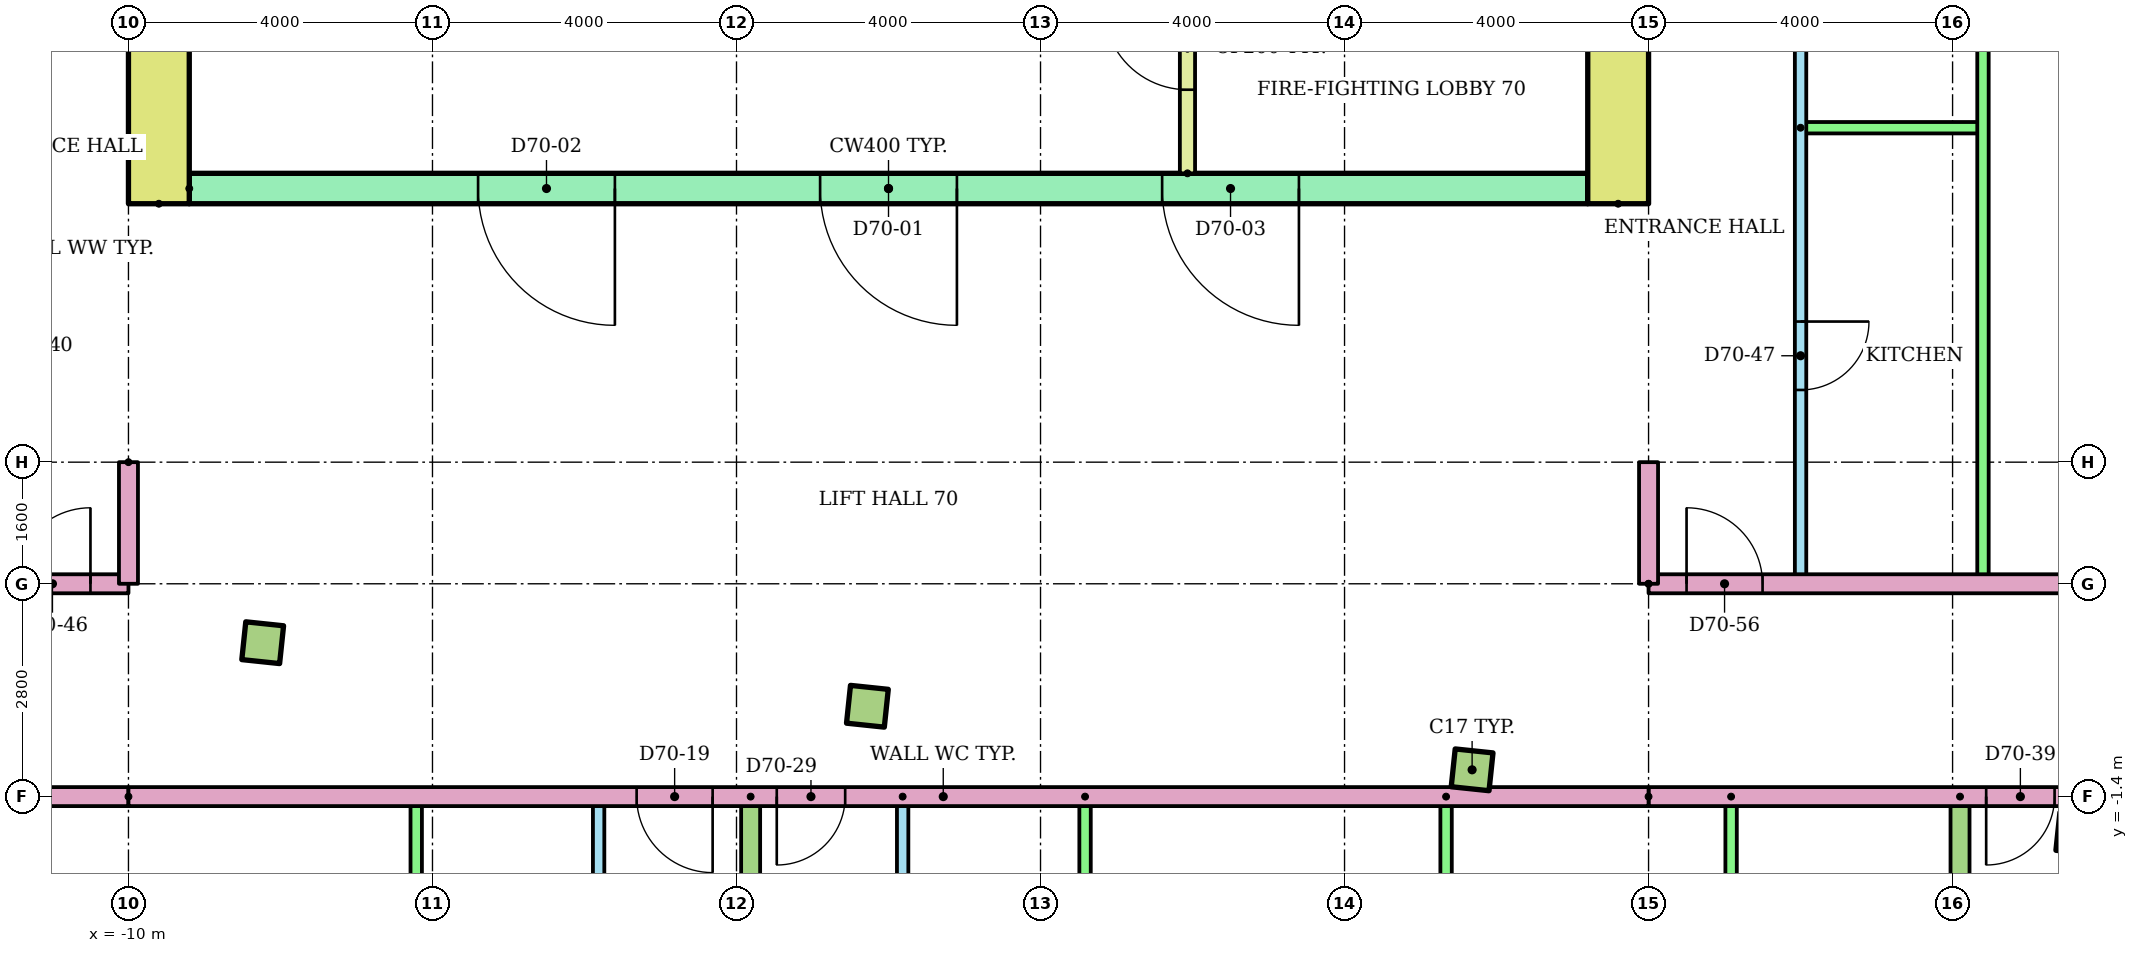
"""IFC4 building model, lengths in metres.
Left out: names, types, materials, properties, quantities, classifications, styles, units other than length and angle.
Written with IfcOpenShell. Run it as: python <this file> out.ifc"""

import sys

from ifc_helpers import new_model, si_unit, direction, frame, frame_2d, origin, origin_2d, place, context, subcontext, project, spatial, rectangle, extrude, element, fill, save


model = new_model("IFC4")
c1 = context("Model", 3, precision=1e-05, world=origin(), true_north=direction((0.0, 1.0)))
c2 = subcontext(c1, "Body", "Model", "MODEL_VIEW")
j1 = project(units=[si_unit("LENGTHUNIT", "METRE"), si_unit("PLANEANGLEUNIT", "RADIAN")], contexts=[c1])
p1 = place(None, origin())
s1 = spatial("IfcSite", under=j1, at=p1, CompositionType="ELEMENT")
p2 = place(p1, origin())
s2 = spatial("IfcBuilding", under=s1, at=p2, CompositionType="ELEMENT")
p3 = place(p2, frame((0.0, 0.0, 269.1)))
s3 = spatial("IfcBuildingStorey", under=s2, at=p3, CompositionType="ELEMENT", Elevation=269.1)
for number, where, z_axis, x_axis in (
    (1, (-8.234, 0.625, 0.0), (0.0, 0.0, 1.0), (0.995, -0.105, 0.0)),
    (2, (-0.278, -0.211, 0.0), (0.0, 0.0, 1.0), (0.995, -0.105, 0.0)),
    (3, (7.678, -1.048, 0.0), (0.0, 0.0, 1.0), (0.995, -0.105, 0.0)),
    (4, (15.635, -1.884, 0.0), (0.0, 0.0, 1.0), (0.995, -0.105, 0.0)),
):
    element("IfcColumn", number, at=place(p3, frame(where, z_axis=z_axis, x_axis=x_axis)), inside=s3, PredefinedType="COLUMN", context=c2, shape_type="SweptSolid", body=[
        extrude(rectangle(XDim=0.5, YDim=0.5, at=origin_2d()), origin(), (0.0, 0.0, 1.0), 3.2),
    ])
for number, where, z_axis, x_axis in (
    (5, (-9.6, 6.4, 0.0), (0.0, 0.0, 1.0), (0.0, 1.0, 0.0)),
    (6, (9.6, 6.4, 0.0), (0.0, 0.0, 1.0), (0.0, 1.0, 0.0)),
):
    element("IfcWall", number, at=place(p3, frame(where, z_axis=z_axis, x_axis=x_axis)), inside=s3, PredefinedType="SHEAR", context=c2, shape_type="SweptSolid", body=[
        extrude(rectangle(XDim=13.6, YDim=0.8, at=frame_2d((6.8, 0.0))), origin(), (0.0, 0.0, 1.0), 2.92),
    ])
p4 = place(p3, frame((-9.2, 6.6, 0.0)))
e7 = element("IfcWall", 7, at=p4, inside=s3, PredefinedType="SHEAR", context=c2, shape_type="SweptSolid", body=[
    extrude(rectangle(XDim=18.4, YDim=0.4, at=frame_2d((9.2, 0.0))), origin(), (0.0, 0.0, 1.0), 2.92),
])
p5 = place(p4, frame((8.3, 0.0, 0.0)))
e8 = element("IfcOpeningElement", 8, at=p5, cuts=e7, PredefinedType="OPENING", context=c2, shape_type="SweptSolid", body=[
    extrude(rectangle(XDim=1.8, YDim=2.1, at=frame_2d((0.9, 1.05))), frame((0.0, 0.21, 0.0), z_axis=(0.0, -1.0, 0.0), x_axis=(1.0, 0.0, 0.0)), (0.0, 0.0, 1.0), 0.42),
])
p6 = place(p4, frame((3.8, 0.0, 0.0)))
e9 = element("IfcOpeningElement", 9, at=p6, cuts=e7, PredefinedType="OPENING", context=c2, shape_type="SweptSolid", body=[
    extrude(rectangle(XDim=1.8, YDim=2.1, at=frame_2d((0.9, 1.05))), frame((0.0, 0.21, 0.0), z_axis=(0.0, -1.0, 0.0), x_axis=(1.0, 0.0, 0.0)), (0.0, 0.0, 1.0), 0.42),
])
p7 = place(p4, frame((12.8, 0.0, 0.0)))
e10 = element("IfcOpeningElement", 10, at=p7, cuts=e7, PredefinedType="OPENING", context=c2, shape_type="SweptSolid", body=[
    extrude(rectangle(XDim=1.8, YDim=2.1, at=frame_2d((0.9, 1.05))), frame((0.0, 0.21, 0.0), z_axis=(0.0, -1.0, 0.0), x_axis=(1.0, 0.0, 0.0)), (0.0, 0.0, 1.0), 0.42),
])
p8 = place(p3, frame((3.933, 6.8, 0.0), z_axis=(0.0, 0.0, 1.0), x_axis=(0.0, 1.0, 0.0)))
e11 = element("IfcWall", 11, at=p8, inside=s3, PredefinedType="PARTITIONING", context=c2, shape_type="SweptSolid", body=[
    extrude(rectangle(XDim=3.3, YDim=0.2, at=frame_2d((1.65, 0.0))), origin(), (0.0, 0.0, 1.0), 2.92),
])
p9 = place(p8, frame((1.1, 0.0, 0.0)))
e12 = element("IfcOpeningElement", 12, at=p9, cuts=e11, PredefinedType="OPENING", context=c2, shape_type="SweptSolid", body=[
    extrude(rectangle(XDim=1.1, YDim=2.1, at=frame_2d((0.55, 1.05))), frame((0.0, 0.11, 0.0), z_axis=(0.0, -1.0, 0.0), x_axis=(1.0, 0.0, 0.0)), (0.0, 0.0, 1.0), 0.22),
])
p10 = place(p3, frame((-3.814, -7.047, 0.0), z_axis=(0.0, 0.0, 1.0), x_axis=(0.0, 1.0, 0.0)))
e13 = element("IfcWall", 13, at=p10, inside=s3, PredefinedType="PARTITIONING", context=c2, shape_type="SweptSolid", body=[
    extrude(rectangle(XDim=5.647, YDim=0.15, at=frame_2d((2.823, 0.0))), origin(), (0.0, 0.0, 1.0), 2.4),
])
p11 = place(p10, frame((3.697, 0.0, 0.0)))
e14 = element("IfcOpeningElement", 14, at=p11, cuts=e13, PredefinedType="OPENING", context=c2, shape_type="SweptSolid", body=[
    extrude(rectangle(XDim=0.9, YDim=2.1, at=frame_2d((0.45, 1.05))), frame((0.0, 0.085, 0.0), z_axis=(0.0, -1.0, 0.0), x_axis=(1.0, 0.0, 0.0)), (0.0, 0.0, 1.0), 0.17),
])
p12 = place(p10, frame((0.923, 0.0, 0.0)))
e15 = element("IfcOpeningElement", 15, at=p12, cuts=e13, PredefinedType="OPENING", context=c2, shape_type="SweptSolid", body=[
    extrude(rectangle(XDim=0.8, YDim=2.1, at=frame_2d((0.4, 1.05))), frame((0.0, 0.085, 0.0), z_axis=(0.0, -1.0, 0.0), x_axis=(1.0, 0.0, 0.0)), (0.0, 0.0, 1.0), 0.17),
])
p13 = place(p3, frame((-6.214, -7.047, 0.0), z_axis=(0.0, 0.0, 1.0), x_axis=(0.0, 1.0, 0.0)))
e16 = element("IfcWall", 16, at=p13, inside=s3, PredefinedType="PARTITIONING", context=c2, shape_type="SweptSolid", body=[
    extrude(rectangle(XDim=5.647, YDim=0.15, at=frame_2d((2.823, 0.0))), origin(), (0.0, 0.0, 1.0), 2.4),
])
p14 = place(p3, frame((0.186, -1.4, 0.0), z_axis=(0.0, 0.0, 1.0), x_axis=(0.0, -1.0, 0.0)))
e17 = element("IfcWall", 17, at=p14, inside=s3, PredefinedType="PARTITIONING", context=c2, shape_type="SweptSolid", body=[
    extrude(rectangle(XDim=7.484, YDim=0.15, at=frame_2d((3.742, 0.0))), origin(), (0.0, 0.0, 1.0), 2.4),
])
p15 = place(p14, frame((1.55, 0.0, 0.0)))
e18 = element("IfcOpeningElement", 18, at=p15, cuts=e17, PredefinedType="OPENING", context=c2, shape_type="SweptSolid", body=[
    extrude(rectangle(XDim=0.9, YDim=2.1, at=frame_2d((0.45, 1.05))), frame((0.0, 0.085, 0.0), z_axis=(0.0, -1.0, 0.0), x_axis=(1.0, 0.0, 0.0)), (0.0, 0.0, 1.0), 0.17),
])
p16 = place(p14, frame((4.966, 0.0, 0.0)))
e19 = element("IfcOpeningElement", 19, at=p16, cuts=e17, PredefinedType="OPENING", context=c2, shape_type="SweptSolid", body=[
    extrude(rectangle(XDim=0.8, YDim=2.1, at=frame_2d((0.4, 1.05))), frame((0.0, 0.085, 0.0), z_axis=(0.0, -1.0, 0.0), x_axis=(1.0, 0.0, 0.0)), (0.0, 0.0, 1.0), 0.17),
])
for number, where, z_axis, x_axis in (
    (20, (2.586, -1.4, 0.0), (0.0, 0.0, 1.0), (0.0, -1.0, 0.0)),
    (21, (7.336, -1.4, 0.0), (0.0, 0.0, 1.0), (0.0, -1.0, 0.0)),
    (22, (11.086, -1.4, 0.0), (0.0, 0.0, 1.0), (0.0, -1.0, 0.0)),
):
    element("IfcWall", number, at=place(p3, frame(where, z_axis=z_axis, x_axis=x_axis)), inside=s3, PredefinedType="PARTITIONING", context=c2, shape_type="SweptSolid", body=[
        extrude(rectangle(XDim=7.484, YDim=0.15, at=frame_2d((3.742, 0.0))), origin(), (0.0, 0.0, 1.0), 2.4),
    ])
p17 = place(p3, frame((-1.814, -1.4, 0.0), z_axis=(0.0, 0.0, 1.0), x_axis=(0.0, -1.0, 0.0)))
e23 = element("IfcWall", 23, at=p17, inside=s3, PredefinedType="PARTITIONING", context=c2, shape_type="SweptSolid", body=[
    extrude(rectangle(XDim=13.341, YDim=0.25, at=frame_2d((6.67, 0.0))), origin(), (0.0, 0.0, 1.0), 2.4),
])
p18 = place(p3, frame((14.098, -1.4, 0.0), z_axis=(0.0, 0.0, 1.0), x_axis=(0.0, -1.0, 0.0)))
e24 = element("IfcWall", 24, at=p18, inside=s3, PredefinedType="PARTITIONING", context=c2, shape_type="SweptSolid", body=[
    extrude(rectangle(XDim=15.013, YDim=0.25, at=frame_2d((7.506, 0.0))), origin(), (0.0, 0.0, 1.0), 2.4),
])
p19 = place(p3, frame((-10.0, -1.4, 0.0), z_axis=(0.0, 0.0, 1.0), x_axis=(-1.0, 0.0, 0.0)))
e25 = element("IfcWall", 25, at=p19, inside=s3, PredefinedType="PARTITIONING", context=c2, shape_type="SweptSolid", body=[
    extrude(rectangle(XDim=13.56, YDim=0.25, at=frame_2d((6.78, 0.0))), origin(), (0.0, 0.0, 1.0), 2.4),
])
p20 = place(p3, frame((25.0, -1.4, 0.0), z_axis=(0.0, 0.0, 1.0), x_axis=(-1.0, 0.0, 0.0)))
e26 = element("IfcWall", 26, at=p20, inside=s3, PredefinedType="PARTITIONING", context=c2, shape_type="SweptSolid", body=[
    extrude(rectangle(XDim=15.0, YDim=0.25, at=frame_2d((7.5, 0.0))), origin(), (0.0, 0.0, 1.0), 2.4),
])
p21 = place(p20, frame((9.658, 0.0, 0.0)))
e27 = element("IfcOpeningElement", 27, at=p21, cuts=e26, PredefinedType="OPENING", context=c2, shape_type="SweptSolid", body=[
    extrude(rectangle(XDim=0.9, YDim=2.1, at=frame_2d((0.45, 1.05))), frame((0.0, 0.135, 0.0), z_axis=(0.0, -1.0, 0.0), x_axis=(1.0, 0.0, 0.0)), (0.0, 0.0, 1.0), 0.27),
])
p22 = place(p3, frame((-23.265, 1.4, 0.0)))
e28 = element("IfcWall", 28, at=p22, inside=s3, PredefinedType="PARTITIONING", context=c2, shape_type="SweptSolid", body=[
    extrude(rectangle(XDim=13.265, YDim=0.25, at=frame_2d((6.633, 0.0))), origin(), (0.0, 0.0, 1.0), 2.4),
])
p23 = place(p22, frame((11.765, 0.0, 0.0)))
e29 = element("IfcOpeningElement", 29, at=p23, cuts=e28, PredefinedType="OPENING", context=c2, shape_type="SweptSolid", body=[
    extrude(rectangle(XDim=1.0, YDim=2.1, at=frame_2d((0.5, 1.05))), frame((0.0, 0.135, 0.0), z_axis=(0.0, -1.0, 0.0), x_axis=(1.0, 0.0, 0.0)), (0.0, 0.0, 1.0), 0.27),
])
p24 = place(p3, frame((12.0, 12.143, 0.0), z_axis=(0.0, 0.0, 1.0), x_axis=(0.0, -1.0, 0.0)))
e30 = element("IfcWall", 30, at=p24, inside=s3, PredefinedType="PARTITIONING", context=c2, shape_type="SweptSolid", body=[
    extrude(rectangle(XDim=10.743, YDim=0.15, at=frame_2d((5.372, 0.0))), origin(), (0.0, 0.0, 1.0), 2.4),
])
p25 = place(p24, frame((7.293, 0.0, 0.0)))
e31 = element("IfcOpeningElement", 31, at=p25, cuts=e30, PredefinedType="OPENING", context=c2, shape_type="SweptSolid", body=[
    extrude(rectangle(XDim=0.9, YDim=2.1, at=frame_2d((0.45, 1.05))), frame((0.0, 0.085, 0.0), z_axis=(0.0, -1.0, 0.0), x_axis=(1.0, 0.0, 0.0)), (0.0, 0.0, 1.0), 0.17),
])
p26 = place(p24, frame((1.972, 0.0, 0.0)))
e32 = element("IfcOpeningElement", 32, at=p26, cuts=e30, PredefinedType="OPENING", context=c2, shape_type="SweptSolid", body=[
    extrude(rectangle(XDim=0.8, YDim=2.1, at=frame_2d((0.4, 1.05))), frame((0.0, 0.085, 0.0), z_axis=(0.0, -1.0, 0.0), x_axis=(1.0, 0.0, 0.0)), (0.0, 0.0, 1.0), 0.17),
])
p27 = place(p3, frame((12.0, 7.4, 0.0)))
e33 = element("IfcWall", 33, at=p27, inside=s3, PredefinedType="PARTITIONING", context=c2, shape_type="SweptSolid", body=[
    extrude(rectangle(XDim=2.4, YDim=0.15, at=frame_2d((1.2, 0.0))), origin(), (0.0, 0.0, 1.0), 2.4),
])
p28 = place(p3, frame((14.4, 12.143, 0.0), z_axis=(0.0, 0.0, 1.0), x_axis=(0.0, -1.0, 0.0)))
e34 = element("IfcWall", 34, at=p28, inside=s3, PredefinedType="PARTITIONING", context=c2, shape_type="SweptSolid", body=[
    extrude(rectangle(XDim=10.743, YDim=0.15, at=frame_2d((5.372, 0.0))), origin(), (0.0, 0.0, 1.0), 2.4),
])
p29 = place(p3, frame((10.0, 1.4, 0.0)))
e35 = element("IfcWall", 35, at=p29, inside=s3, PredefinedType="PARTITIONING", context=c2, shape_type="SweptSolid", body=[
    extrude(rectangle(XDim=15.0, YDim=0.25, at=frame_2d((7.5, 0.0))), origin(), (0.0, 0.0, 1.0), 2.4),
])
p30 = place(p29, frame((0.5, 0.0, 0.0)))
e36 = element("IfcOpeningElement", 36, at=p30, cuts=e35, PredefinedType="OPENING", context=c2, shape_type="SweptSolid", body=[
    extrude(rectangle(XDim=1.0, YDim=2.1, at=frame_2d((0.5, 1.05))), frame((0.0, 0.135, 0.0), z_axis=(0.0, -1.0, 0.0), x_axis=(1.0, 0.0, 0.0)), (0.0, 0.0, 1.0), 0.27),
])
p31 = place(p3, frame((10.0, -1.4, 0.0), z_axis=(0.0, 0.0, 1.0), x_axis=(-1.0, 0.0, 0.0)))
e37 = element("IfcWall", 37, at=p31, inside=s3, PredefinedType="PARTITIONING", context=c2, shape_type="SweptSolid", body=[
    extrude(rectangle(XDim=20.0, YDim=0.25, at=frame_2d((10.0, 0.0))), origin(), (0.0, 0.0, 1.0), 2.4),
])
p32 = place(p31, frame((12.314, 0.0, 0.0)))
e38 = element("IfcOpeningElement", 38, at=p32, cuts=e37, PredefinedType="OPENING", context=c2, shape_type="SweptSolid", body=[
    extrude(rectangle(XDim=1.0, YDim=2.1, at=frame_2d((0.5, 1.05))), frame((0.0, 0.135, 0.0), z_axis=(0.0, -1.0, 0.0), x_axis=(1.0, 0.0, 0.0)), (0.0, 0.0, 1.0), 0.27),
])
p33 = place(p31, frame((10.57, 0.0, 0.0)))
e39 = element("IfcOpeningElement", 39, at=p33, cuts=e37, PredefinedType="OPENING", context=c2, shape_type="SweptSolid", body=[
    extrude(rectangle(XDim=0.9, YDim=2.1, at=frame_2d((0.45, 1.05))), frame((0.0, 0.135, 0.0), z_axis=(0.0, -1.0, 0.0), x_axis=(1.0, 0.0, 0.0)), (0.0, 0.0, 1.0), 0.27),
])
for number, where, z_axis, x_axis in (
    (40, (-10.0, 3.0, 0.0), (0.0, 0.0, 1.0), (0.0, -1.0, 0.0)),
    (41, (10.0, 1.4, 0.0), (0.0, 0.0, 1.0), (0.0, 1.0, 0.0)),
):
    element("IfcWall", number, at=place(p3, frame(where, z_axis=z_axis, x_axis=x_axis)), inside=s3, PredefinedType="PARTITIONING", context=c2, shape_type="SweptSolid", body=[
        extrude(rectangle(XDim=1.6, YDim=0.25, at=frame_2d((0.8, 0.0))), origin(), (0.0, 0.0, 1.0), 2.4),
    ])
p34 = place(p5, frame((1.8, 0.0, 0.0), z_axis=(0.0, 0.0, 1.0), x_axis=(-1.0, 0.0, 0.0)))
e42 = element("IfcDoor", 42, at=p34, inside=s3, OperationType="DOUBLE_DOOR_SINGLE_SWING", PredefinedType="DOOR", context=c2, shape_type="SweptSolid", body=[
    extrude(rectangle(XDim=1.8, YDim=2.1, at=frame_2d((0.9, 1.05))), frame((0.0, 0.025, 0.0), z_axis=(0.0, -1.0, 0.0), x_axis=(1.0, 0.0, 0.0)), (0.0, 0.0, 1.0), 0.05),
])
fill(e8, e42)
p35 = place(p6, frame((1.8, 0.0, 0.0), z_axis=(0.0, 0.0, 1.0), x_axis=(-1.0, 0.0, 0.0)))
e43 = element("IfcDoor", 43, at=p35, inside=s3, OperationType="DOUBLE_DOOR_SINGLE_SWING", PredefinedType="DOOR", context=c2, shape_type="SweptSolid", body=[
    extrude(rectangle(XDim=1.8, YDim=2.1, at=frame_2d((0.9, 1.05))), frame((0.0, 0.025, 0.0), z_axis=(0.0, -1.0, 0.0), x_axis=(1.0, 0.0, 0.0)), (0.0, 0.0, 1.0), 0.05),
])
fill(e9, e43)
p36 = place(p7, frame((1.8, 0.0, 0.0), z_axis=(0.0, 0.0, 1.0), x_axis=(-1.0, 0.0, 0.0)))
e44 = element("IfcDoor", 44, at=p36, inside=s3, OperationType="DOUBLE_DOOR_SINGLE_SWING", PredefinedType="DOOR", context=c2, shape_type="SweptSolid", body=[
    extrude(rectangle(XDim=1.8, YDim=2.1, at=frame_2d((0.9, 1.05))), frame((0.0, 0.025, 0.0), z_axis=(0.0, -1.0, 0.0), x_axis=(1.0, 0.0, 0.0)), (0.0, 0.0, 1.0), 0.05),
])
fill(e10, e44)
p37 = place(p9, origin())
e45 = element("IfcDoor", 45, at=p37, inside=s3, OperationType="SINGLE_SWING_RIGHT", PredefinedType="DOOR", context=c2, shape_type="SweptSolid", body=[
    extrude(rectangle(XDim=1.1, YDim=2.1, at=frame_2d((0.55, 1.05))), frame((0.0, 0.025, 0.0), z_axis=(0.0, -1.0, 0.0), x_axis=(1.0, 0.0, 0.0)), (0.0, 0.0, 1.0), 0.05),
])
fill(e12, e45)
p38 = place(p32, origin())
e46 = element("IfcDoor", 46, at=p38, inside=s3, OperationType="SINGLE_SWING_LEFT", PredefinedType="DOOR", context=c2, shape_type="SweptSolid", body=[
    extrude(rectangle(XDim=1.0, YDim=2.1, at=frame_2d((0.5, 1.05))), frame((0.0, 0.025, 0.0), z_axis=(0.0, -1.0, 0.0), x_axis=(1.0, 0.0, 0.0)), (0.0, 0.0, 1.0), 0.05),
])
fill(e38, e46)
p39 = place(p33, origin())
e47 = element("IfcDoor", 47, at=p39, inside=s3, OperationType="SINGLE_SWING_RIGHT", PredefinedType="DOOR", context=c2, shape_type="SweptSolid", body=[
    extrude(rectangle(XDim=0.9, YDim=2.1, at=frame_2d((0.45, 1.05))), frame((0.0, 0.025, 0.0), z_axis=(0.0, -1.0, 0.0), x_axis=(1.0, 0.0, 0.0)), (0.0, 0.0, 1.0), 0.05),
])
fill(e39, e47)
p40 = place(p21, origin())
e48 = element("IfcDoor", 48, at=p40, inside=s3, OperationType="SINGLE_SWING_RIGHT", PredefinedType="DOOR", context=c2, shape_type="SweptSolid", body=[
    extrude(rectangle(XDim=0.9, YDim=2.1, at=frame_2d((0.45, 1.05))), frame((0.0, 0.025, 0.0), z_axis=(0.0, -1.0, 0.0), x_axis=(1.0, 0.0, 0.0)), (0.0, 0.0, 1.0), 0.05),
])
fill(e27, e48)
p41 = place(p23, origin())
e49 = element("IfcDoor", 49, at=p41, inside=s3, OperationType="SINGLE_SWING_RIGHT", PredefinedType="DOOR", context=c2, shape_type="SweptSolid", body=[
    extrude(rectangle(XDim=1.0, YDim=2.1, at=frame_2d((0.5, 1.05))), frame((0.0, 0.025, 0.0), z_axis=(0.0, -1.0, 0.0), x_axis=(1.0, 0.0, 0.0)), (0.0, 0.0, 1.0), 0.05),
])
fill(e29, e49)
p42 = place(p25, origin())
e50 = element("IfcDoor", 50, at=p42, inside=s3, OperationType="SINGLE_SWING_LEFT", PredefinedType="DOOR", context=c2, shape_type="SweptSolid", body=[
    extrude(rectangle(XDim=0.9, YDim=2.1, at=frame_2d((0.45, 1.05))), frame((0.0, 0.025, 0.0), z_axis=(0.0, -1.0, 0.0), x_axis=(1.0, 0.0, 0.0)), (0.0, 0.0, 1.0), 0.05),
])
fill(e31, e50)
p43 = place(p30, origin())
e51 = element("IfcDoor", 51, at=p43, inside=s3, OperationType="SINGLE_SWING_LEFT", PredefinedType="DOOR", context=c2, shape_type="SweptSolid", body=[
    extrude(rectangle(XDim=1.0, YDim=2.1, at=frame_2d((0.5, 1.05))), frame((0.0, 0.025, 0.0), z_axis=(0.0, -1.0, 0.0), x_axis=(1.0, 0.0, 0.0)), (0.0, 0.0, 1.0), 0.05),
])
fill(e36, e51)
save(model, sys.argv[1])
